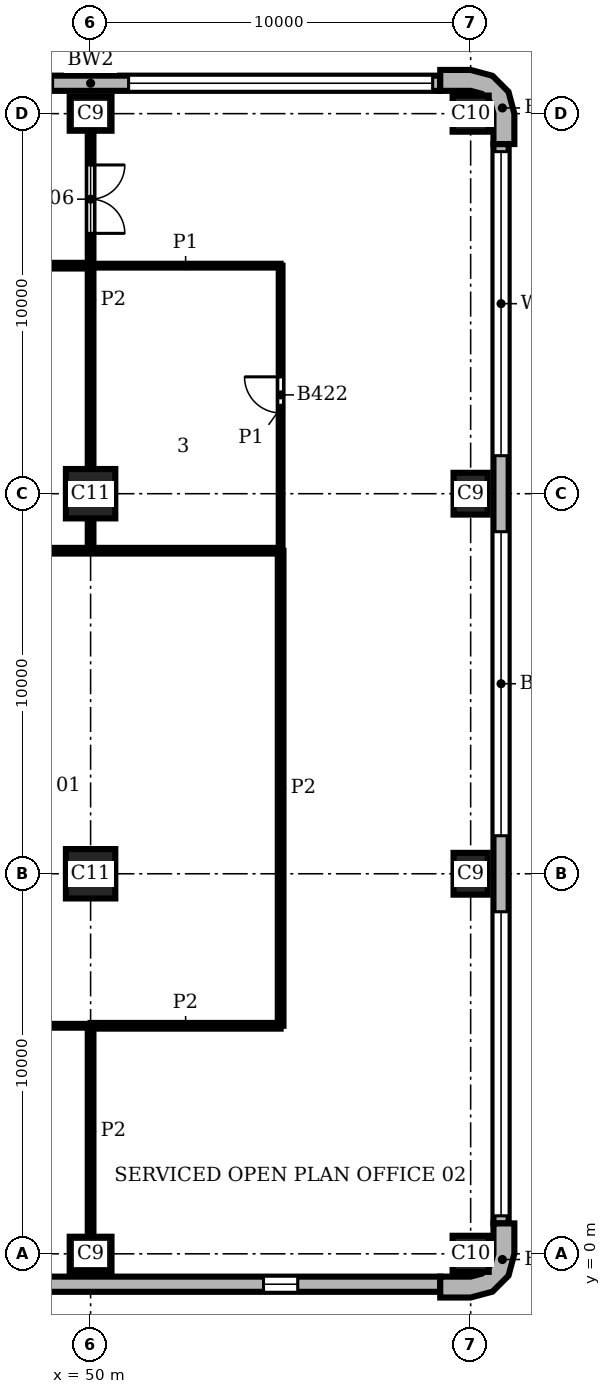
"""IFC4 building model, lengths in metres.
Left out: names, types, materials, properties, quantities, classifications, styles, units other than length and angle.
Written with IfcOpenShell. Run it as: python <this file> out.ifc"""

import sys

from ifc_helpers import new_model, si_unit, direction, frame, frame_2d, origin, origin_2d, place, context, subcontext, project, spatial, polyline, rectangle, outline, extrude, element, fill, save


model = new_model("IFC4")
c1 = context("Model", 3, precision=1e-05, world=origin(), true_north=direction((0.0, 1.0)))
c2 = subcontext(c1, "Body", "Model", "MODEL_VIEW")
j1 = project(units=[si_unit("LENGTHUNIT", "METRE"), si_unit("PLANEANGLEUNIT", "RADIAN")], contexts=[c1])
p1 = place(None, origin())
s1 = spatial("IfcSite", under=j1, at=p1, CompositionType="ELEMENT")
p2 = place(p1, origin())
s2 = spatial("IfcBuilding", under=s1, at=p2, CompositionType="ELEMENT")
p3 = place(p2, frame((0.0, 0.0, 166.8)))
s3 = spatial("IfcBuildingStorey", under=s2, at=p3, CompositionType="ELEMENT", Elevation=166.8)
p4 = place(p3, frame((50.0, 0.0, 0.0), z_axis=(0.0, 0.0, 1.0), x_axis=(1.0, 0.0, 0.0)))
e1 = element("IfcColumn", 1, at=p4, inside=s3, PredefinedType="COLUMN", context=c2, shape_type="SweptSolid", body=[
    extrude(rectangle(XDim=1.1, YDim=0.9, at=origin_2d()), origin(), (0.0, 0.0, 1.0), 3.9),
])
p5 = place(p3, frame((60.0, 0.0, 0.0), z_axis=(0.0, 0.0, 1.0), x_axis=(1.0, 0.0, 0.0)))
e2 = element("IfcColumn", 2, at=p5, inside=s3, PredefinedType="COLUMN", context=c2, shape_type="SweptSolid", body=[
    extrude(rectangle(XDim=0.95, YDim=0.95, at=origin_2d()), origin(), (0.0, 0.0, 1.0), 3.9),
])
for number, where, z_axis, x_axis in (
    (3, (60.0, 10.0, 0.0), (0.0, 0.0, 1.0), (0.0, 1.0, 0.0)),
    (4, (60.0, 20.0, 0.0), (0.0, 0.0, 1.0), (0.0, 1.0, 0.0)),
):
    element("IfcColumn", number, at=place(p3, frame(where, z_axis=z_axis, x_axis=x_axis)), inside=s3, PredefinedType="COLUMN", context=c2, shape_type="SweptSolid", body=[
        extrude(rectangle(XDim=1.1, YDim=0.9, at=origin_2d()), origin(), (0.0, 0.0, 1.0), 3.9),
    ])
p6 = place(p3, frame((60.0, 30.0, 0.0), z_axis=(0.0, 0.0, 1.0), x_axis=(1.0, 0.0, 0.0)))
e5 = element("IfcColumn", 5, at=p6, inside=s3, PredefinedType="COLUMN", context=c2, shape_type="SweptSolid", body=[
    extrude(rectangle(XDim=0.95, YDim=0.95, at=origin_2d()), origin(), (0.0, 0.0, 1.0), 3.9),
])
p7 = place(p3, frame((50.0, 30.0, 0.0), z_axis=(0.0, 0.0, 1.0), x_axis=(1.0, 0.0, 0.0)))
e6 = element("IfcColumn", 6, at=p7, inside=s3, PredefinedType="COLUMN", context=c2, shape_type="SweptSolid", body=[
    extrude(rectangle(XDim=1.1, YDim=0.9, at=origin_2d()), origin(), (0.0, 0.0, 1.0), 3.9),
])
for number, where, z_axis, x_axis in (
    (7, (50.0, 10.0, 0.0), (0.0, 0.0, 1.0), (1.0, 0.0, 0.0)),
    (8, (50.0, 20.0, 0.0), (0.0, 0.0, 1.0), (1.0, 0.0, 0.0)),
):
    element("IfcColumn", number, at=place(p3, frame(where, z_axis=z_axis, x_axis=x_axis)), inside=s3, PredefinedType="COLUMN", context=c2, shape_type="SweptSolid", body=[
        extrude(rectangle(XDim=1.3, YDim=1.3, at=origin_2d()), origin(), (0.0, 0.0, 1.0), 3.9),
    ])
p8 = place(p3, origin())
e9 = element("IfcWall", 9, at=p8, inside=s3, PredefinedType="SOLIDWALL", context=c2, shape_type="SweptSolid", body=[
    extrude(outline(polyline([(59.2, -1.0), (59.2, -1.15), (60.0, -1.15), (60.575, -0.996), (60.996, -0.575), (61.15, 0.0), (61.15, 0.8), (61.0, 0.8), (60.6, 0.8), (60.6, 0.0), (60.52, -0.3), (60.3, -0.52), (60.0, -0.6), (59.2, -0.6), (59.2, -1.0)])), origin(), (0.0, 0.0, 1.0), 3.9),
])
e10 = element("IfcWall", 10, at=p8, inside=s3, PredefinedType="SOLIDWALL", context=c2, shape_type="SweptSolid", body=[
    extrude(outline(polyline([(61.0, 29.2), (61.15, 29.2), (61.15, 30.0), (60.996, 30.575), (60.575, 30.996), (60.0, 31.15), (59.2, 31.15), (59.2, 31.0), (59.2, 30.6), (60.0, 30.6), (60.3, 30.52), (60.52, 30.3), (60.6, 30.0), (60.6, 29.2), (61.0, 29.2)])), origin(), (0.0, 0.0, 1.0), 3.9),
])
p9 = place(p3, frame((20.8, -0.8, 0.0), z_axis=(0.0, 0.0, 1.0), x_axis=(1.0, 0.0, 0.0)))
e11 = element("IfcWall", 11, at=p9, inside=s3, PredefinedType="SOLIDWALL", context=c2, shape_type="SweptSolid", body=[
    extrude(rectangle(XDim=38.4, YDim=0.4, at=frame_2d((19.2, 0.0))), origin(), (0.0, 0.0, 1.0), 3.9),
])
p10 = place(p9, frame((3.75, 0.0, 0.9)))
e12 = element("IfcOpeningElement", 12, at=p10, cuts=e11, PredefinedType="OPENING", context=c2, shape_type="SweptSolid", body=[
    extrude(rectangle(XDim=0.9, YDim=2.35, at=frame_2d((0.45, 1.175))), frame((0.0, 0.21, 0.0), z_axis=(0.0, -1.0, 0.0), x_axis=(1.0, 0.0, 0.0)), (0.0, 0.0, 1.0), 0.42),
])
p11 = place(p9, frame((13.75, 0.0, 0.9)))
e13 = element("IfcOpeningElement", 13, at=p11, cuts=e11, PredefinedType="OPENING", context=c2, shape_type="SweptSolid", body=[
    extrude(rectangle(XDim=0.9, YDim=2.35, at=frame_2d((0.45, 1.175))), frame((0.0, 0.21, 0.0), z_axis=(0.0, -1.0, 0.0), x_axis=(1.0, 0.0, 0.0)), (0.0, 0.0, 1.0), 0.42),
])
p12 = place(p9, frame((23.75, 0.0, 0.9)))
e14 = element("IfcOpeningElement", 14, at=p12, cuts=e11, PredefinedType="OPENING", context=c2, shape_type="SweptSolid", body=[
    extrude(rectangle(XDim=0.9, YDim=2.35, at=frame_2d((0.45, 1.175))), frame((0.0, 0.21, 0.0), z_axis=(0.0, -1.0, 0.0), x_axis=(1.0, 0.0, 0.0)), (0.0, 0.0, 1.0), 0.42),
])
p13 = place(p9, frame((33.75, 0.0, 0.9)))
e15 = element("IfcOpeningElement", 15, at=p13, cuts=e11, PredefinedType="OPENING", context=c2, shape_type="SweptSolid", body=[
    extrude(rectangle(XDim=0.9, YDim=2.35, at=frame_2d((0.45, 1.175))), frame((0.0, 0.21, 0.0), z_axis=(0.0, -1.0, 0.0), x_axis=(1.0, 0.0, 0.0)), (0.0, 0.0, 1.0), 0.42),
])
p14 = place(p3, frame((60.8, 0.8, 0.0), z_axis=(0.0, 0.0, 1.0), x_axis=(0.0, 1.0, 0.0)))
e16 = element("IfcWall", 16, at=p14, inside=s3, PredefinedType="SOLIDWALL", context=c2, shape_type="SweptSolid", body=[
    extrude(rectangle(XDim=28.4, YDim=0.4, at=frame_2d((14.2, 0.0))), origin(), (0.0, 0.0, 1.0), 3.9),
])
p15 = place(p14, frame((0.2, 0.0, 0.9)))
e17 = element("IfcOpeningElement", 17, at=p15, cuts=e16, PredefinedType="OPENING", context=c2, shape_type="SweptSolid", body=[
    extrude(rectangle(XDim=8.0, YDim=2.35, at=frame_2d((4.0, 1.175))), frame((0.0, 0.21, 0.0), z_axis=(0.0, -1.0, 0.0), x_axis=(1.0, 0.0, 0.0)), (0.0, 0.0, 1.0), 0.42),
])
p16 = place(p14, frame((10.2, 0.0, 0.9)))
e18 = element("IfcOpeningElement", 18, at=p16, cuts=e16, PredefinedType="OPENING", context=c2, shape_type="SweptSolid", body=[
    extrude(rectangle(XDim=8.0, YDim=2.35, at=frame_2d((4.0, 1.175))), frame((0.0, 0.21, 0.0), z_axis=(0.0, -1.0, 0.0), x_axis=(1.0, 0.0, 0.0)), (0.0, 0.0, 1.0), 0.42),
])
p17 = place(p14, frame((20.2, 0.0, 0.9)))
e19 = element("IfcOpeningElement", 19, at=p17, cuts=e16, PredefinedType="OPENING", context=c2, shape_type="SweptSolid", body=[
    extrude(rectangle(XDim=8.0, YDim=2.35, at=frame_2d((4.0, 1.175))), frame((0.0, 0.21, 0.0), z_axis=(0.0, -1.0, 0.0), x_axis=(1.0, 0.0, 0.0)), (0.0, 0.0, 1.0), 0.42),
])
p18 = place(p3, frame((59.2, 30.8, 0.0), z_axis=(0.0, 0.0, 1.0), x_axis=(-1.0, 0.0, 0.0)))
e20 = element("IfcWall", 20, at=p18, inside=s3, PredefinedType="SOLIDWALL", context=c2, shape_type="SweptSolid", body=[
    extrude(rectangle(XDim=18.4, YDim=0.4, at=frame_2d((9.2, 0.0))), origin(), (0.0, 0.0, 1.0), 3.9),
])
p19 = place(p18, frame((0.2, 0.0, 0.9)))
e21 = element("IfcOpeningElement", 21, at=p19, cuts=e20, PredefinedType="OPENING", context=c2, shape_type="SweptSolid", body=[
    extrude(rectangle(XDim=8.0, YDim=2.35, at=frame_2d((4.0, 1.175))), frame((0.0, 0.21, 0.0), z_axis=(0.0, -1.0, 0.0), x_axis=(1.0, 0.0, 0.0)), (0.0, 0.0, 1.0), 0.42),
])
p20 = place(p18, frame((10.2, 0.0, 0.9)))
e22 = element("IfcOpeningElement", 22, at=p20, cuts=e20, PredefinedType="OPENING", context=c2, shape_type="SweptSolid", body=[
    extrude(rectangle(XDim=8.0, YDim=2.35, at=frame_2d((4.0, 1.175))), frame((0.0, 0.21, 0.0), z_axis=(0.0, -1.0, 0.0), x_axis=(1.0, 0.0, 0.0)), (0.0, 0.0, 1.0), 0.42),
])
p21 = place(p3, frame((55.0, 18.5, 0.0), z_axis=(0.0, 0.0, 1.0), x_axis=(0.0, 1.0, 0.0)))
e23 = element("IfcWall", 23, at=p21, inside=s3, PredefinedType="PARTITIONING", context=c2, shape_type="SweptSolid", body=[
    extrude(rectangle(XDim=7.5, YDim=0.1, at=frame_2d((3.75, 0.0))), origin(), (0.0, 0.0, 1.0), 3.58),
])
p22 = place(p21, frame((3.625, 0.0, 0.0)))
e24 = element("IfcOpeningElement", 24, at=p22, cuts=e23, PredefinedType="OPENING", context=c2, shape_type="SweptSolid", body=[
    extrude(rectangle(XDim=0.95, YDim=2.1, at=frame_2d((0.475, 1.05))), frame((0.0, 0.06, 0.0), z_axis=(0.0, -1.0, 0.0), x_axis=(1.0, 0.0, 0.0)), (0.0, 0.0, 1.0), 0.12),
])
p23 = place(p3, frame((40.0, 6.0, 0.0), z_axis=(0.0, 0.0, 1.0), x_axis=(1.0, 0.0, 0.0)))
e25 = element("IfcWall", 25, at=p23, inside=s3, PredefinedType="PARTITIONING", context=c2, shape_type="SweptSolid", body=[
    extrude(rectangle(XDim=10.0, YDim=0.1, at=frame_2d((5.0, 0.0))), origin(), (0.0, 0.0, 1.0), 3.58),
])
p24 = place(p23, frame((5.625, 0.0, 0.0)))
e26 = element("IfcOpeningElement", 26, at=p24, cuts=e25, PredefinedType="OPENING", context=c2, shape_type="SweptSolid", body=[
    extrude(rectangle(XDim=0.95, YDim=2.1, at=frame_2d((0.475, 1.05))), frame((0.0, 0.06, 0.0), z_axis=(0.0, -1.0, 0.0), x_axis=(1.0, 0.0, 0.0)), (0.0, 0.0, 1.0), 0.12),
])
p25 = place(p3, frame((50.0, 26.0, 0.0), z_axis=(0.0, 0.0, 1.0), x_axis=(1.0, 0.0, 0.0)))
e27 = element("IfcWall", 27, at=p25, inside=s3, PredefinedType="PARTITIONING", context=c2, shape_type="SweptSolid", body=[
    extrude(rectangle(XDim=5.0, YDim=0.1, at=frame_2d((2.5, 0.0))), origin(), (0.0, 0.0, 1.0), 3.58),
])
p26 = place(p3, frame((50.0, 0.45, 0.0), z_axis=(0.0, 0.0, 1.0), x_axis=(0.0, 1.0, 0.0)))
e28 = element("IfcWall", 28, at=p26, inside=s3, PredefinedType="PARTITIONING", context=c2, shape_type="SweptSolid", body=[
    extrude(rectangle(XDim=5.55, YDim=0.15, at=frame_2d((2.775, 0.0))), origin(), (0.0, 0.0, 1.0), 3.58),
])
p27 = place(p3, frame((50.0, 18.5, 0.0), z_axis=(0.0, 0.0, 1.0), x_axis=(0.0, 1.0, 0.0)))
e29 = element("IfcWall", 29, at=p27, inside=s3, PredefinedType="PARTITIONING", context=c2, shape_type="SweptSolid", body=[
    extrude(rectangle(XDim=0.85, YDim=0.15, at=frame_2d((0.425, 0.0))), origin(), (0.0, 0.0, 1.0), 3.58),
])
p28 = place(p3, frame((50.0, 20.65, 0.0), z_axis=(0.0, 0.0, 1.0), x_axis=(0.0, 1.0, 0.0)))
e30 = element("IfcWall", 30, at=p28, inside=s3, PredefinedType="PARTITIONING", context=c2, shape_type="SweptSolid", body=[
    extrude(rectangle(XDim=8.9, YDim=0.15, at=frame_2d((4.45, 0.0))), origin(), (0.0, 0.0, 1.0), 3.58),
])
p29 = place(p28, frame((6.2, 0.0, 0.0)))
e31 = element("IfcOpeningElement", 31, at=p29, cuts=e30, PredefinedType="OPENING", context=c2, shape_type="SweptSolid", body=[
    extrude(rectangle(XDim=1.8, YDim=2.1, at=frame_2d((0.9, 1.05))), frame((0.0, 0.085, 0.0), z_axis=(0.0, -1.0, 0.0), x_axis=(1.0, 0.0, 0.0)), (0.0, 0.0, 1.0), 0.17),
])
p30 = place(p3, frame((55.0, 6.0, 0.0), z_axis=(0.0, 0.0, 1.0), x_axis=(0.0, 1.0, 0.0)))
e32 = element("IfcWall", 32, at=p30, inside=s3, PredefinedType="PARTITIONING", context=c2, shape_type="SweptSolid", body=[
    extrude(rectangle(XDim=12.5, YDim=0.15, at=frame_2d((6.25, 0.0))), origin(), (0.0, 0.0, 1.0), 3.58),
])
p31 = place(p3, frame((50.0, 6.0, 0.0), z_axis=(0.0, 0.0, 1.0), x_axis=(1.0, 0.0, 0.0)))
e33 = element("IfcWall", 33, at=p31, inside=s3, PredefinedType="PARTITIONING", context=c2, shape_type="SweptSolid", body=[
    extrude(rectangle(XDim=5.0, YDim=0.15, at=frame_2d((2.5, 0.0))), origin(), (0.0, 0.0, 1.0), 3.58),
])
p32 = place(p3, frame((33.2, 18.5, 0.0), z_axis=(0.0, 0.0, 1.0), x_axis=(1.0, 0.0, 0.0)))
e34 = element("IfcWall", 34, at=p32, inside=s3, PredefinedType="PARTITIONING", context=c2, shape_type="SweptSolid", body=[
    extrude(rectangle(XDim=21.8, YDim=0.15, at=frame_2d((10.9, 0.0))), origin(), (0.0, 0.0, 1.0), 3.58),
])
p33 = place(p3, frame((33.2, 26.0, 0.0), z_axis=(0.0, 0.0, 1.0), x_axis=(1.0, 0.0, 0.0)))
e35 = element("IfcWall", 35, at=p33, inside=s3, PredefinedType="PARTITIONING", context=c2, shape_type="SweptSolid", body=[
    extrude(rectangle(XDim=16.8, YDim=0.15, at=frame_2d((8.4, 0.0))), origin(), (0.0, 0.0, 1.0), 3.58),
])
p34 = place(p33, frame((10.65, 0.0, 0.0)))
e36 = element("IfcOpeningElement", 36, at=p34, cuts=e35, PredefinedType="OPENING", context=c2, shape_type="SweptSolid", body=[
    extrude(rectangle(XDim=1.0, YDim=2.1, at=frame_2d((0.5, 1.05))), frame((0.0, 0.085, 0.0), z_axis=(0.0, -1.0, 0.0), x_axis=(1.0, 0.0, 0.0)), (0.0, 0.0, 1.0), 0.17),
])
p35 = place(p13, origin())
e37 = element("IfcWindow", 37, at=p35, inside=s3, PartitioningType="SINGLE_PANEL", PredefinedType="WINDOW", context=c2, shape_type="SweptSolid", body=[
    extrude(rectangle(XDim=0.9, YDim=2.35, at=frame_2d((0.45, 1.175))), frame((0.0, 0.16, 0.0), z_axis=(0.0, -1.0, 0.0), x_axis=(1.0, 0.0, 0.0)), (0.0, 0.0, 1.0), 0.06),
])
fill(e15, e37)
p36 = place(p15, origin())
e38 = element("IfcWindow", 38, at=p36, inside=s3, PartitioningType="SINGLE_PANEL", PredefinedType="WINDOW", context=c2, shape_type="SweptSolid", body=[
    extrude(rectangle(XDim=8.0, YDim=2.35, at=frame_2d((4.0, 1.175))), frame((0.0, 0.16, 0.0), z_axis=(0.0, -1.0, 0.0), x_axis=(1.0, 0.0, 0.0)), (0.0, 0.0, 1.0), 0.06),
])
fill(e17, e38)
p37 = place(p16, origin())
e39 = element("IfcWindow", 39, at=p37, inside=s3, PartitioningType="SINGLE_PANEL", PredefinedType="WINDOW", context=c2, shape_type="SweptSolid", body=[
    extrude(rectangle(XDim=8.0, YDim=2.35, at=frame_2d((4.0, 1.175))), frame((0.0, 0.16, 0.0), z_axis=(0.0, -1.0, 0.0), x_axis=(1.0, 0.0, 0.0)), (0.0, 0.0, 1.0), 0.06),
])
fill(e18, e39)
p38 = place(p17, origin())
e40 = element("IfcWindow", 40, at=p38, inside=s3, PartitioningType="SINGLE_PANEL", PredefinedType="WINDOW", context=c2, shape_type="SweptSolid", body=[
    extrude(rectangle(XDim=8.0, YDim=2.35, at=frame_2d((4.0, 1.175))), frame((0.0, 0.16, 0.0), z_axis=(0.0, -1.0, 0.0), x_axis=(1.0, 0.0, 0.0)), (0.0, 0.0, 1.0), 0.06),
])
fill(e19, e40)
p39 = place(p19, origin())
e41 = element("IfcWindow", 41, at=p39, inside=s3, PartitioningType="SINGLE_PANEL", PredefinedType="WINDOW", context=c2, shape_type="SweptSolid", body=[
    extrude(rectangle(XDim=8.0, YDim=2.35, at=frame_2d((4.0, 1.175))), frame((0.0, 0.16, 0.0), z_axis=(0.0, -1.0, 0.0), x_axis=(1.0, 0.0, 0.0)), (0.0, 0.0, 1.0), 0.06),
])
fill(e21, e41)
p40 = place(p29, frame((1.8, 0.0, 0.0), z_axis=(0.0, 0.0, 1.0), x_axis=(-1.0, 0.0, 0.0)))
e42 = element("IfcDoor", 42, at=p40, inside=s3, OperationType="DOUBLE_DOOR_SINGLE_SWING", PredefinedType="DOOR", context=c2, shape_type="SweptSolid", body=[
    extrude(rectangle(XDim=1.8, YDim=2.1, at=frame_2d((0.9, 1.05))), frame((0.0, 0.025, 0.0), z_axis=(0.0, -1.0, 0.0), x_axis=(1.0, 0.0, 0.0)), (0.0, 0.0, 1.0), 0.05),
])
fill(e31, e42)
p41 = place(p22, origin())
e43 = element("IfcDoor", 43, at=p41, inside=s3, OperationType="SINGLE_SWING_RIGHT", PredefinedType="DOOR", context=c2, shape_type="SweptSolid", body=[
    extrude(rectangle(XDim=0.95, YDim=2.1, at=frame_2d((0.475, 1.05))), frame((0.0, 0.025, 0.0), z_axis=(0.0, -1.0, 0.0), x_axis=(1.0, 0.0, 0.0)), (0.0, 0.0, 1.0), 0.05),
])
fill(e24, e43)
save(model, sys.argv[1])
